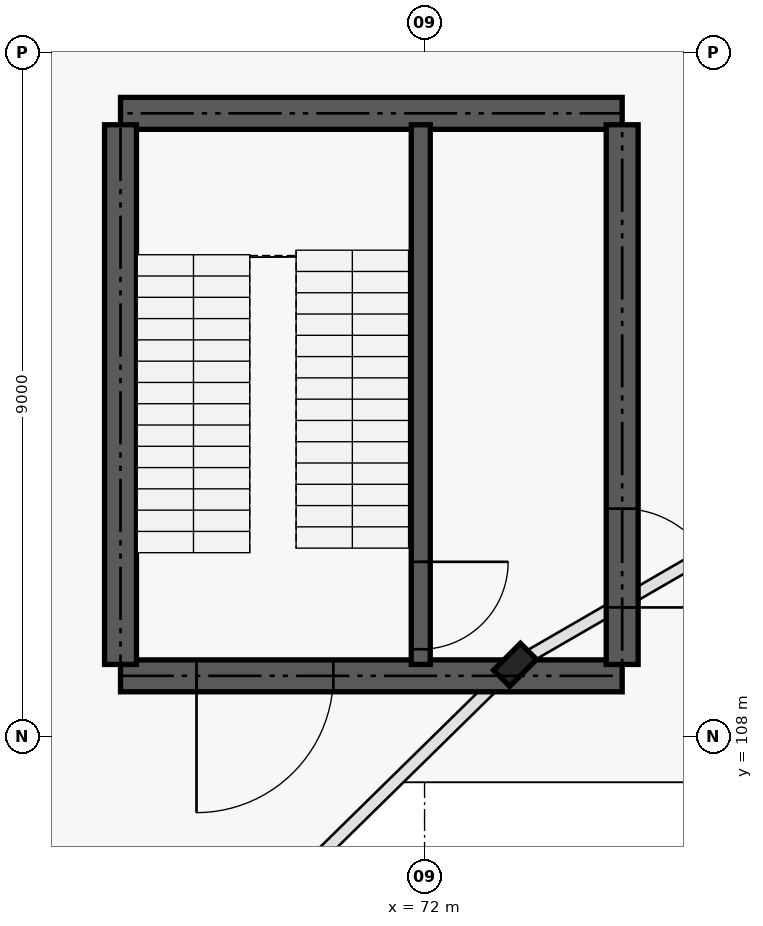
"""IFC4 building model, lengths in metres.
Left out: names, types, materials, properties, quantities, classifications, styles, units other than length and angle.
Written with IfcOpenShell. Run it as: python <this file> out.ifc"""

import sys

from ifc_helpers import new_model, si_unit, direction, frame, frame_2d, origin, origin_2d, place, context, subcontext, project, spatial, rectangle, i_section, extrude, element, fill, save


model = new_model("IFC4")
c1 = context("Model", 3, precision=1e-05, world=origin(), true_north=direction((0.0, 1.0)))
c2 = subcontext(c1, "Body", "Model", "MODEL_VIEW")
j1 = project(units=[si_unit("LENGTHUNIT", "METRE"), si_unit("PLANEANGLEUNIT", "RADIAN")], contexts=[c1])
p1 = place(None, origin())
s1 = spatial("IfcSite", under=j1, at=p1, CompositionType="ELEMENT")
p2 = place(p1, origin())
s2 = spatial("IfcBuilding", under=s1, at=p2, CompositionType="ELEMENT")
p3 = place(p2, origin())
s3 = spatial("IfcBuildingStorey", under=s2, at=p3, CompositionType="ELEMENT", Elevation=0.0)
p4 = place(p3, frame((73.191, 108.945, 0.0), z_axis=(0.0, 0.0, 1.0), x_axis=(-0.707106781187, 0.707106781187, 0.0)))
e1 = element("IfcColumn", 1, at=p4, inside=s3, PredefinedType="COLUMN", context=c2, shape_type="SweptSolid", body=[
    extrude(i_section(OverallWidth=0.3, OverallDepth=0.5, WebThickness=0.014, FlangeThickness=0.028, FilletRadius=0.027, at=origin_2d()), origin(), (0.0, 0.0, 1.0), 5.4),
])
p5 = place(p3, frame((68.0, 108.8, 0.0), z_axis=(0.0, 0.0, 1.0), x_axis=(1.0, 0.0, 0.0)))
e2 = element("IfcWall", 2, at=p5, inside=s3, PredefinedType="SHEAR", context=c2, shape_type="SweptSolid", body=[
    extrude(rectangle(XDim=6.6, YDim=0.42, at=frame_2d((3.3, 0.0))), origin(), (0.0, 0.0, 1.0), 5.4),
])
p6 = place(p5, frame((1.0, 0.0, 0.0)))
e3 = element("IfcOpeningElement", 3, at=p6, cuts=e2, PredefinedType="OPENING", context=c2, shape_type="SweptSolid", body=[
    extrude(rectangle(XDim=1.8, YDim=2.15, at=frame_2d((0.9, 1.075))), frame((0.0, 0.22, 0.0), z_axis=(0.0, -1.0, 0.0), x_axis=(1.0, 0.0, 0.0)), (0.0, 0.0, 1.0), 0.44),
])
p7 = place(p3, frame((68.0, 116.2, 0.0), z_axis=(0.0, 0.0, 1.0), x_axis=(1.0, 0.0, 0.0)))
e4 = element("IfcWall", 4, at=p7, inside=s3, PredefinedType="SHEAR", context=c2, shape_type="SweptSolid", body=[
    extrude(rectangle(XDim=6.6, YDim=0.42, at=frame_2d((3.3, 0.0))), origin(), (0.0, 0.0, 1.0), 5.4),
])
p8 = place(p3, frame((68.0, 108.95, 0.0), z_axis=(0.0, 0.0, 1.0), x_axis=(0.0, 1.0, 0.0)))
e5 = element("IfcWall", 5, at=p8, inside=s3, PredefinedType="SHEAR", context=c2, shape_type="SweptSolid", body=[
    extrude(rectangle(XDim=7.1, YDim=0.42, at=frame_2d((3.55, 0.0))), origin(), (0.0, 0.0, 1.0), 5.4),
])
p9 = place(p3, frame((74.6, 108.95, 0.0), z_axis=(0.0, 0.0, 1.0), x_axis=(0.0, 1.0, 0.0)))
e6 = element("IfcWall", 6, at=p9, inside=s3, PredefinedType="SHEAR", context=c2, shape_type="SweptSolid", body=[
    extrude(rectangle(XDim=7.1, YDim=0.42, at=frame_2d((3.55, 0.0))), origin(), (0.0, 0.0, 1.0), 5.4),
])
p10 = place(p9, frame((0.75, 0.0, 0.0)))
e7 = element("IfcOpeningElement", 7, at=p10, cuts=e6, PredefinedType="OPENING", context=c2, shape_type="SweptSolid", body=[
    extrude(rectangle(XDim=1.3, YDim=2.15, at=frame_2d((0.65, 1.075))), frame((0.0, 0.22, 0.0), z_axis=(0.0, -1.0, 0.0), x_axis=(1.0, 0.0, 0.0)), (0.0, 0.0, 1.0), 0.44),
])
p11 = place(p3, frame((71.95, 108.95, 0.0), z_axis=(0.0, 0.0, 1.0), x_axis=(0.0, 1.0, 0.0)))
e8 = element("IfcWall", 8, at=p11, inside=s3, PredefinedType="SHEAR", context=c2, shape_type="SweptSolid", body=[
    extrude(rectangle(XDim=7.1, YDim=0.25, at=frame_2d((3.55, 0.0))), origin(), (0.0, 0.0, 1.0), 5.4),
])
p12 = place(p11, frame((0.2, 0.0, 0.0)))
e9 = element("IfcOpeningElement", 9, at=p12, cuts=e8, PredefinedType="OPENING", context=c2, shape_type="SweptSolid", body=[
    extrude(rectangle(XDim=1.15, YDim=2.15, at=frame_2d((0.575, 1.075))), frame((0.0, 0.135, 0.0), z_axis=(0.0, -1.0, 0.0), x_axis=(1.0, 0.0, 0.0)), (0.0, 0.0, 1.0), 0.27),
])
p13 = place(p10, frame((1.3, 0.0, 0.0), z_axis=(0.0, 0.0, 1.0), x_axis=(-1.0, 0.0, 0.0)))
e10 = element("IfcDoor", 10, at=p13, inside=s3, OperationType="DOUBLE_DOOR_SINGLE_SWING", PredefinedType="DOOR", context=c2, shape_type="SweptSolid", body=[
    extrude(rectangle(XDim=1.3, YDim=2.15, at=frame_2d((0.65, 1.075))), frame((0.0, 0.025, 0.0), z_axis=(0.0, -1.0, 0.0), x_axis=(1.0, 0.0, 0.0)), (0.0, 0.0, 1.0), 0.05),
])
fill(e7, e10)
p14 = place(p12, origin())
e11 = element("IfcDoor", 11, at=p14, inside=s3, OperationType="SINGLE_SWING_RIGHT", PredefinedType="DOOR", context=c2, shape_type="SweptSolid", body=[
    extrude(rectangle(XDim=1.15, YDim=2.15, at=frame_2d((0.575, 1.075))), frame((0.0, 0.025, 0.0), z_axis=(0.0, -1.0, 0.0), x_axis=(1.0, 0.0, 0.0)), (0.0, 0.0, 1.0), 0.05),
])
fill(e9, e11)
p15 = place(p6, frame((1.8, 0.0, 0.0), z_axis=(0.0, 0.0, 1.0), x_axis=(-1.0, 0.0, 0.0)))
e12 = element("IfcDoor", 12, at=p15, inside=s3, OperationType="DOUBLE_DOOR_SINGLE_SWING", PredefinedType="DOOR", context=c2, shape_type="SweptSolid", body=[
    extrude(rectangle(XDim=1.8, YDim=2.15, at=frame_2d((0.9, 1.075))), frame((0.0, 0.025, 0.0), z_axis=(0.0, -1.0, 0.0), x_axis=(1.0, 0.0, 0.0)), (0.0, 0.0, 1.0), 0.05),
])
fill(e3, e12)
save(model, sys.argv[1])
